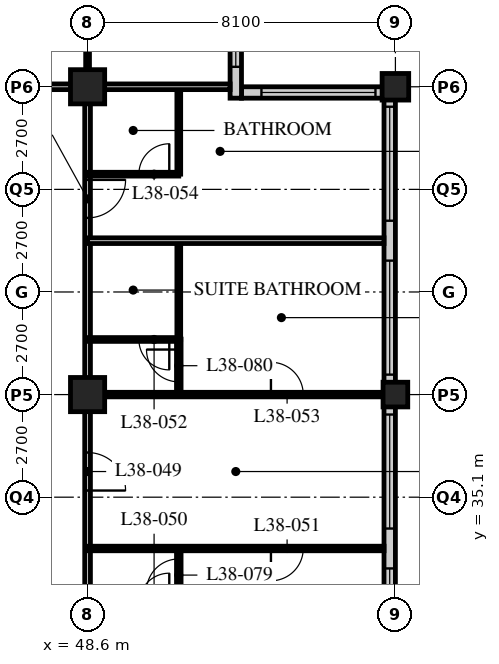
"""IFC4 building model, lengths in metres.
Left out: names, types, materials, properties, quantities, classifications, styles, units other than length and angle.
Written with IfcOpenShell. Run it as: python <this file> out.ifc"""

import sys

from ifc_helpers import new_model, si_unit, direction, frame, frame_2d, origin, origin_2d, place, context, subcontext, project, spatial, rectangle, hollow_rectangle, extrude, element, fill, save


model = new_model("IFC4")
c1 = context("Model", 3, precision=1e-05, world=origin(), true_north=direction((0.0, 1.0)))
c2 = subcontext(c1, "Body", "Model", "MODEL_VIEW")
j1 = project(units=[si_unit("LENGTHUNIT", "METRE"), si_unit("PLANEANGLEUNIT", "RADIAN")], contexts=[c1])
p1 = place(None, origin())
s1 = spatial("IfcSite", under=j1, at=p1, CompositionType="ELEMENT")
p2 = place(p1, origin())
s2 = spatial("IfcBuilding", under=s1, at=p2, CompositionType="ELEMENT")
p3 = place(p2, frame((0.0, 0.0, 147.6)))
s3 = spatial("IfcBuildingStorey", under=s2, at=p3, CompositionType="ELEMENT", Elevation=147.6)
for number, where, z_axis, x_axis in (
    (1, (48.6, 37.8, 0.0), (0.0, 0.0, 1.0), (1.0, 0.0, 0.0)),
    (2, (48.6, 45.9, 0.0), (0.0, 0.0, 1.0), (1.0, 0.0, 0.0)),
):
    element("IfcColumn", number, at=place(p3, frame(where, z_axis=z_axis, x_axis=x_axis)), inside=s3, PredefinedType="COLUMN", context=c2, shape_type="SweptSolid", body=[
        extrude(hollow_rectangle(XDim=0.9, YDim=0.9, WallThickness=0.1, at=origin_2d()), origin(), (0.0, 0.0, 1.0), 3.4),
    ])
p4 = place(p3, frame((56.7, 37.8, 0.0), z_axis=(0.0, 0.0, 1.0), x_axis=(1.0, 0.0, 0.0)))
e3 = element("IfcColumn", 3, at=p4, inside=s3, PredefinedType="COLUMN", context=c2, shape_type="SweptSolid", body=[
    extrude(hollow_rectangle(XDim=0.65, YDim=0.65, WallThickness=0.055, at=origin_2d()), origin(), (0.0, 0.0, 1.0), 3.4),
])
p5 = place(p3, frame((56.7, 45.9, 0.0), z_axis=(0.0, 0.0, 1.0), x_axis=(1.0, 0.0, 0.0)))
e4 = element("IfcColumn", 4, at=p5, inside=s3, PredefinedType="COLUMN", context=c2, shape_type="SweptSolid", body=[
    extrude(hollow_rectangle(XDim=0.7, YDim=0.7, WallThickness=0.07, at=origin_2d()), origin(), (0.0, 0.0, 1.0), 3.4),
])
p6 = place(p3, frame((56.55, 13.8, 0.0), z_axis=(0.0, 0.0, 1.0), x_axis=(0.0, 1.0, 0.0)))
e5 = element("IfcWall", 5, at=p6, inside=s3, PredefinedType="SOLIDWALL", context=c2, shape_type="SweptSolid", body=[
    extrude(rectangle(XDim=32.1, YDim=0.3, at=frame_2d((16.05, 0.0))), origin(), (0.0, 0.0, 1.0), 3.19),
])
p7 = place(p6, frame((0.225, 0.0, 0.9)))
e6 = element("IfcOpeningElement", 6, at=p7, cuts=e5, PredefinedType="OPENING", context=c2, shape_type="SweptSolid", body=[
    extrude(rectangle(XDim=3.0, YDim=1.4, at=frame_2d((1.5, 0.7))), frame((0.0, 0.16, 0.0), z_axis=(0.0, -1.0, 0.0), x_axis=(1.0, 0.0, 0.0)), (0.0, 0.0, 1.0), 0.32),
])
p8 = place(p6, frame((4.275, 0.0, 0.9)))
e7 = element("IfcOpeningElement", 7, at=p8, cuts=e5, PredefinedType="OPENING", context=c2, shape_type="SweptSolid", body=[
    extrude(rectangle(XDim=3.0, YDim=1.4, at=frame_2d((1.5, 0.7))), frame((0.0, 0.16, 0.0), z_axis=(0.0, -1.0, 0.0), x_axis=(1.0, 0.0, 0.0)), (0.0, 0.0, 1.0), 0.32),
])
p9 = place(p6, frame((8.325, 0.0, 0.9)))
e8 = element("IfcOpeningElement", 8, at=p9, cuts=e5, PredefinedType="OPENING", context=c2, shape_type="SweptSolid", body=[
    extrude(rectangle(XDim=3.0, YDim=1.4, at=frame_2d((1.5, 0.7))), frame((0.0, 0.16, 0.0), z_axis=(0.0, -1.0, 0.0), x_axis=(1.0, 0.0, 0.0)), (0.0, 0.0, 1.0), 0.32),
])
p10 = place(p6, frame((12.375, 0.0, 0.9)))
e9 = element("IfcOpeningElement", 9, at=p10, cuts=e5, PredefinedType="OPENING", context=c2, shape_type="SweptSolid", body=[
    extrude(rectangle(XDim=3.0, YDim=1.4, at=frame_2d((1.5, 0.7))), frame((0.0, 0.16, 0.0), z_axis=(0.0, -1.0, 0.0), x_axis=(1.0, 0.0, 0.0)), (0.0, 0.0, 1.0), 0.32),
])
p11 = place(p6, frame((16.425, 0.0, 0.9)))
e10 = element("IfcOpeningElement", 10, at=p11, cuts=e5, PredefinedType="OPENING", context=c2, shape_type="SweptSolid", body=[
    extrude(rectangle(XDim=3.0, YDim=1.4, at=frame_2d((1.5, 0.7))), frame((0.0, 0.16, 0.0), z_axis=(0.0, -1.0, 0.0), x_axis=(1.0, 0.0, 0.0)), (0.0, 0.0, 1.0), 0.32),
])
p12 = place(p6, frame((20.475, 0.0, 0.9)))
e11 = element("IfcOpeningElement", 11, at=p12, cuts=e5, PredefinedType="OPENING", context=c2, shape_type="SweptSolid", body=[
    extrude(rectangle(XDim=3.0, YDim=1.4, at=frame_2d((1.5, 0.7))), frame((0.0, 0.16, 0.0), z_axis=(0.0, -1.0, 0.0), x_axis=(1.0, 0.0, 0.0)), (0.0, 0.0, 1.0), 0.32),
])
p13 = place(p6, frame((24.525, 0.0, 0.9)))
e12 = element("IfcOpeningElement", 12, at=p13, cuts=e5, PredefinedType="OPENING", context=c2, shape_type="SweptSolid", body=[
    extrude(rectangle(XDim=3.0, YDim=1.4, at=frame_2d((1.5, 0.7))), frame((0.0, 0.16, 0.0), z_axis=(0.0, -1.0, 0.0), x_axis=(1.0, 0.0, 0.0)), (0.0, 0.0, 1.0), 0.32),
])
p14 = place(p6, frame((28.575, 0.0, 0.9)))
e13 = element("IfcOpeningElement", 13, at=p14, cuts=e5, PredefinedType="OPENING", context=c2, shape_type="SweptSolid", body=[
    extrude(rectangle(XDim=3.0, YDim=1.4, at=frame_2d((1.5, 0.7))), frame((0.0, 0.16, 0.0), z_axis=(0.0, -1.0, 0.0), x_axis=(1.0, 0.0, 0.0)), (0.0, 0.0, 1.0), 0.32),
])
p15 = place(p3, frame((56.4, 45.75, 0.0), z_axis=(0.0, 0.0, 1.0), x_axis=(-1.0, 0.0, 0.0)))
e14 = element("IfcWall", 14, at=p15, inside=s3, PredefinedType="SOLIDWALL", context=c2, shape_type="SweptSolid", body=[
    extrude(rectangle(XDim=3.75, YDim=0.3, at=frame_2d((1.875, 0.0))), origin(), (0.0, 0.0, 1.0), 3.19),
])
p16 = place(p15, frame((0.225, 0.0, 0.9)))
e15 = element("IfcOpeningElement", 15, at=p16, cuts=e14, PredefinedType="OPENING", context=c2, shape_type="SweptSolid", body=[
    extrude(rectangle(XDim=3.0, YDim=1.4, at=frame_2d((1.5, 0.7))), frame((0.0, 0.16, 0.0), z_axis=(0.0, -1.0, 0.0), x_axis=(1.0, 0.0, 0.0)), (0.0, 0.0, 1.0), 0.32),
])
p17 = place(p3, frame((52.5, 45.6, 0.0), z_axis=(0.0, 0.0, 1.0), x_axis=(0.0, 1.0, 0.0)))
e16 = element("IfcWall", 16, at=p17, inside=s3, PredefinedType="SOLIDWALL", context=c2, shape_type="SweptSolid", body=[
    extrude(rectangle(XDim=4.35, YDim=0.3, at=frame_2d((2.175, 0.0))), origin(), (0.0, 0.0, 1.0), 3.19),
])
p18 = place(p17, frame((0.825, 0.0, 0.9)))
e17 = element("IfcOpeningElement", 17, at=p18, cuts=e16, PredefinedType="OPENING", context=c2, shape_type="SweptSolid", body=[
    extrude(rectangle(XDim=3.0, YDim=1.4, at=frame_2d((1.5, 0.7))), frame((0.0, 0.16, 0.0), z_axis=(0.0, -1.0, 0.0), x_axis=(1.0, 0.0, 0.0)), (0.0, 0.0, 1.0), 0.32),
])
p19 = place(p3, frame((12.15, 45.9, 0.0), z_axis=(0.0, 0.0, 1.0), x_axis=(1.0, 0.0, 0.0)))
e18 = element("IfcWall", 18, at=p19, inside=s3, PredefinedType="PARTITIONING", context=c2, shape_type="SweptSolid", body=[
    extrude(rectangle(XDim=36.45, YDim=0.15, at=frame_2d((18.225, 0.0))), origin(), (0.0, 0.0, 1.0), 2.42),
])
p20 = place(p19, frame((9.225, 0.0, 0.0)))
e19 = element("IfcOpeningElement", 19, at=p20, cuts=e18, PredefinedType="OPENING", context=c2, shape_type="SweptSolid", body=[
    extrude(rectangle(XDim=1.8, YDim=2.4, at=frame_2d((0.9, 1.2))), frame((0.0, 0.085, 0.0), z_axis=(0.0, -1.0, 0.0), x_axis=(1.0, 0.0, 0.0)), (0.0, 0.0, 1.0), 0.17),
])
p21 = place(p19, frame((21.65, 0.0, 0.0)))
e20 = element("IfcOpeningElement", 20, at=p21, cuts=e18, PredefinedType="OPENING", context=c2, shape_type="SweptSolid", body=[
    extrude(rectangle(XDim=1.0, YDim=2.1, at=frame_2d((0.5, 1.05))), frame((0.0, 0.085, 0.0), z_axis=(0.0, -1.0, 0.0), x_axis=(1.0, 0.0, 0.0)), (0.0, 0.0, 1.0), 0.17),
])
p22 = place(p19, frame((24.9, 0.0, 0.0)))
e21 = element("IfcOpeningElement", 21, at=p22, cuts=e18, PredefinedType="OPENING", context=c2, shape_type="SweptSolid", body=[
    extrude(rectangle(XDim=1.0, YDim=2.1, at=frame_2d((0.5, 1.05))), frame((0.0, 0.085, 0.0), z_axis=(0.0, -1.0, 0.0), x_axis=(1.0, 0.0, 0.0)), (0.0, 0.0, 1.0), 0.17),
])
p23 = place(p19, frame((30.8, 0.0, 0.0)))
e22 = element("IfcOpeningElement", 22, at=p23, cuts=e18, PredefinedType="OPENING", context=c2, shape_type="SweptSolid", body=[
    extrude(rectangle(XDim=1.0, YDim=2.1, at=frame_2d((0.5, 1.05))), frame((0.0, 0.085, 0.0), z_axis=(0.0, -1.0, 0.0), x_axis=(1.0, 0.0, 0.0)), (0.0, 0.0, 1.0), 0.17),
])
p24 = place(p19, frame((32.825, 0.0, 0.0)))
e23 = element("IfcOpeningElement", 23, at=p24, cuts=e18, PredefinedType="OPENING", context=c2, shape_type="SweptSolid", body=[
    extrude(rectangle(XDim=1.0, YDim=2.1, at=frame_2d((0.5, 1.05))), frame((0.0, 0.085, 0.0), z_axis=(0.0, -1.0, 0.0), x_axis=(1.0, 0.0, 0.0)), (0.0, 0.0, 1.0), 0.17),
])
p25 = place(p19, frame((1.525, 0.0, 0.0)))
e24 = element("IfcOpeningElement", 24, at=p25, cuts=e18, PredefinedType="OPENING", context=c2, shape_type="SweptSolid", body=[
    extrude(rectangle(XDim=1.0, YDim=2.1, at=frame_2d((0.5, 1.05))), frame((0.0, 0.085, 0.0), z_axis=(0.0, -1.0, 0.0), x_axis=(1.0, 0.0, 0.0)), (0.0, 0.0, 1.0), 0.17),
])
p26 = place(p3, frame((48.6, 21.6, 0.0), z_axis=(0.0, 0.0, 1.0), x_axis=(0.0, 1.0, 0.0)))
e25 = element("IfcWall", 25, at=p26, inside=s3, PredefinedType="PARTITIONING", context=c2, shape_type="SweptSolid", body=[
    extrude(rectangle(XDim=24.3, YDim=0.15, at=frame_2d((12.15, 0.0))), origin(), (0.0, 0.0, 1.0), 2.42),
])
p27 = place(p26, frame((2.75, 0.0, 0.0)))
e26 = element("IfcOpeningElement", 26, at=p27, cuts=e25, PredefinedType="OPENING", context=c2, shape_type="SweptSolid", body=[
    extrude(rectangle(XDim=1.0, YDim=2.1, at=frame_2d((0.5, 1.05))), frame((0.0, 0.085, 0.0), z_axis=(0.0, -1.0, 0.0), x_axis=(1.0, 0.0, 0.0)), (0.0, 0.0, 1.0), 0.17),
])
p28 = place(p26, frame((4.65, 0.0, 0.0)))
e27 = element("IfcOpeningElement", 27, at=p28, cuts=e25, PredefinedType="OPENING", context=c2, shape_type="SweptSolid", body=[
    extrude(rectangle(XDim=1.0, YDim=2.1, at=frame_2d((0.5, 1.05))), frame((0.0, 0.085, 0.0), z_axis=(0.0, -1.0, 0.0), x_axis=(1.0, 0.0, 0.0)), (0.0, 0.0, 1.0), 0.17),
])
p29 = place(p26, frame((13.675, 0.0, 0.0)))
e28 = element("IfcOpeningElement", 28, at=p29, cuts=e25, PredefinedType="OPENING", context=c2, shape_type="SweptSolid", body=[
    extrude(rectangle(XDim=1.0, YDim=2.1, at=frame_2d((0.5, 1.05))), frame((0.0, 0.085, 0.0), z_axis=(0.0, -1.0, 0.0), x_axis=(1.0, 0.0, 0.0)), (0.0, 0.0, 1.0), 0.17),
])
p30 = place(p26, frame((20.85, 0.0, 0.0)))
e29 = element("IfcOpeningElement", 29, at=p30, cuts=e25, PredefinedType="OPENING", context=c2, shape_type="SweptSolid", body=[
    extrude(rectangle(XDim=1.0, YDim=2.1, at=frame_2d((0.5, 1.05))), frame((0.0, 0.085, 0.0), z_axis=(0.0, -1.0, 0.0), x_axis=(1.0, 0.0, 0.0)), (0.0, 0.0, 1.0), 0.17),
])
p31 = place(p3, frame((48.6, 33.75, 0.0), z_axis=(0.0, 0.0, 1.0), x_axis=(1.0, 0.0, 0.0)))
e30 = element("IfcWall", 30, at=p31, inside=s3, PredefinedType="PARTITIONING", context=c2, shape_type="SweptSolid", body=[
    extrude(rectangle(XDim=7.8, YDim=0.12, at=frame_2d((3.9, 0.0))), origin(), (0.0, 0.0, 1.0), 3.19),
])
p32 = place(p31, frame((4.825, 0.0, 0.0)))
e31 = element("IfcOpeningElement", 31, at=p32, cuts=e30, PredefinedType="OPENING", context=c2, shape_type="SweptSolid", body=[
    extrude(rectangle(XDim=0.85, YDim=2.1, at=frame_2d((0.425, 1.05))), frame((0.0, 0.07, 0.0), z_axis=(0.0, -1.0, 0.0), x_axis=(1.0, 0.0, 0.0)), (0.0, 0.0, 1.0), 0.14),
])
p33 = place(p3, frame((51.0, 39.25, 0.0), z_axis=(0.0, 0.0, 1.0), x_axis=(0.0, 1.0, 0.0)))
e32 = element("IfcWall", 32, at=p33, inside=s3, PredefinedType="PARTITIONING", context=c2, shape_type="SweptSolid", body=[
    extrude(rectangle(XDim=2.6, YDim=0.1, at=frame_2d((1.3, 0.0))), origin(), (0.0, 0.0, 1.0), 3.19),
])
p34 = place(p3, frame((48.6, 39.25, 0.0), z_axis=(0.0, 0.0, 1.0), x_axis=(1.0, 0.0, 0.0)))
e33 = element("IfcWall", 33, at=p34, inside=s3, PredefinedType="PARTITIONING", context=c2, shape_type="SweptSolid", body=[
    extrude(rectangle(XDim=2.4, YDim=0.1, at=frame_2d((1.2, 0.0))), origin(), (0.0, 0.0, 1.0), 3.19),
])
p35 = place(p34, frame((1.35, 0.0, 0.0)))
e34 = element("IfcOpeningElement", 34, at=p35, cuts=e33, PredefinedType="OPENING", context=c2, shape_type="SweptSolid", body=[
    extrude(rectangle(XDim=0.8, YDim=2.1, at=frame_2d((0.4, 1.05))), frame((0.0, 0.06, 0.0), z_axis=(0.0, -1.0, 0.0), x_axis=(1.0, 0.0, 0.0)), (0.0, 0.0, 1.0), 0.12),
])
p36 = place(p3, frame((48.6, 37.8, 0.0), z_axis=(0.0, 0.0, 1.0), x_axis=(1.0, 0.0, 0.0)))
e35 = element("IfcWall", 35, at=p36, inside=s3, PredefinedType="PARTITIONING", context=c2, shape_type="SweptSolid", body=[
    extrude(rectangle(XDim=7.8, YDim=0.12, at=frame_2d((3.9, 0.0))), origin(), (0.0, 0.0, 1.0), 2.42),
])
p37 = place(p36, frame((4.825, 0.0, 0.0)))
e36 = element("IfcOpeningElement", 36, at=p37, cuts=e35, PredefinedType="OPENING", context=c2, shape_type="SweptSolid", body=[
    extrude(rectangle(XDim=0.85, YDim=2.1, at=frame_2d((0.425, 1.05))), frame((0.0, 0.07, 0.0), z_axis=(0.0, -1.0, 0.0), x_axis=(1.0, 0.0, 0.0)), (0.0, 0.0, 1.0), 0.14),
])
p38 = place(p3, frame((48.6, 41.85, 0.0), z_axis=(0.0, 0.0, 1.0), x_axis=(1.0, 0.0, 0.0)))
e37 = element("IfcWall", 37, at=p38, inside=s3, PredefinedType="PARTITIONING", context=c2, shape_type="SweptSolid", body=[
    extrude(rectangle(XDim=7.8, YDim=0.15, at=frame_2d((3.9, 0.0))), origin(), (0.0, 0.0, 1.0), 3.19),
])
p39 = place(p3, frame((51.0, 43.6, 0.0), z_axis=(0.0, 0.0, 1.0), x_axis=(0.0, 1.0, 0.0)))
e38 = element("IfcWall", 38, at=p39, inside=s3, PredefinedType="PARTITIONING", context=c2, shape_type="SweptSolid", body=[
    extrude(rectangle(XDim=2.3, YDim=0.1, at=frame_2d((1.15, 0.0))), origin(), (0.0, 0.0, 1.0), 3.19),
])
p40 = place(p3, frame((48.6, 43.6, 0.0), z_axis=(0.0, 0.0, 1.0), x_axis=(1.0, 0.0, 0.0)))
e39 = element("IfcWall", 39, at=p40, inside=s3, PredefinedType="PARTITIONING", context=c2, shape_type="SweptSolid", body=[
    extrude(rectangle(XDim=2.4, YDim=0.1, at=frame_2d((1.2, 0.0))), origin(), (0.0, 0.0, 1.0), 3.19),
])
p41 = place(p40, frame((1.35, 0.0, 0.0)))
e40 = element("IfcOpeningElement", 40, at=p41, cuts=e39, PredefinedType="OPENING", context=c2, shape_type="SweptSolid", body=[
    extrude(rectangle(XDim=0.8, YDim=2.1, at=frame_2d((0.4, 1.05))), frame((0.0, 0.06, 0.0), z_axis=(0.0, -1.0, 0.0), x_axis=(1.0, 0.0, 0.0)), (0.0, 0.0, 1.0), 0.12),
])
p42 = place(p3, frame((48.6, 45.9, 0.0), z_axis=(0.0, 0.0, 1.0), x_axis=(0.0, 1.0, 0.0)))
e41 = element("IfcWall", 41, at=p42, inside=s3, PredefinedType="PARTITIONING", context=c2, shape_type="SweptSolid", body=[
    extrude(rectangle(XDim=2.4, YDim=0.1, at=frame_2d((1.2, 0.0))), origin(), (0.0, 0.0, 1.0), 2.42),
])
p43 = place(p3, frame((48.6, 45.9, 0.0), z_axis=(0.0, 0.0, 1.0), x_axis=(1.0, 0.0, 0.0)))
e42 = element("IfcWall", 42, at=p43, inside=s3, PredefinedType="PARTITIONING", context=c2, shape_type="SweptSolid", body=[
    extrude(rectangle(XDim=3.75, YDim=0.15, at=frame_2d((1.875, 0.0))), origin(), (0.0, 0.0, 1.0), 2.42),
])
p44 = place(p3, frame((51.0, 33.75, 0.0), z_axis=(0.0, 0.0, 1.0), x_axis=(0.0, -1.0, 0.0)))
e43 = element("IfcWall", 43, at=p44, inside=s3, PredefinedType="PARTITIONING", context=c2, shape_type="SweptSolid", body=[
    extrude(rectangle(XDim=1.46, YDim=0.12, at=frame_2d((0.73, 0.0))), origin(), (0.0, 0.0, 1.0), 3.19),
])
p45 = place(p44, frame((0.275, 0.0, 0.0)))
e44 = element("IfcOpeningElement", 44, at=p45, cuts=e43, PredefinedType="OPENING", context=c2, shape_type="SweptSolid", body=[
    extrude(rectangle(XDim=0.85, YDim=2.1, at=frame_2d((0.425, 1.05))), frame((0.0, 0.07, 0.0), z_axis=(0.0, -1.0, 0.0), x_axis=(1.0, 0.0, 0.0)), (0.0, 0.0, 1.0), 0.14),
])
p46 = place(p3, frame((51.0, 39.26, 0.0), z_axis=(0.0, 0.0, 1.0), x_axis=(0.0, -1.0, 0.0)))
e45 = element("IfcWall", 45, at=p46, inside=s3, PredefinedType="PARTITIONING", context=c2, shape_type="SweptSolid", body=[
    extrude(rectangle(XDim=1.46, YDim=0.12, at=frame_2d((0.73, 0.0))), origin(), (0.0, 0.0, 1.0), 3.19),
])
p47 = place(p46, frame((0.275, 0.0, 0.0)))
e46 = element("IfcOpeningElement", 46, at=p47, cuts=e45, PredefinedType="OPENING", context=c2, shape_type="SweptSolid", body=[
    extrude(rectangle(XDim=0.85, YDim=2.1, at=frame_2d((0.425, 1.05))), frame((0.0, 0.07, 0.0), z_axis=(0.0, -1.0, 0.0), x_axis=(1.0, 0.0, 0.0)), (0.0, 0.0, 1.0), 0.14),
])
p48 = place(p11, origin())
e47 = element("IfcWindow", 47, at=p48, inside=s3, PartitioningType="SINGLE_PANEL", PredefinedType="WINDOW", context=c2, shape_type="SweptSolid", body=[
    extrude(rectangle(XDim=3.0, YDim=1.4, at=frame_2d((1.5, 0.7))), frame((0.0, 0.03, 0.0), z_axis=(0.0, -1.0, 0.0), x_axis=(1.0, 0.0, 0.0)), (0.0, 0.0, 1.0), 0.06),
])
fill(e10, e47)
p49 = place(p12, origin())
e48 = element("IfcWindow", 48, at=p49, inside=s3, PartitioningType="SINGLE_PANEL", PredefinedType="WINDOW", context=c2, shape_type="SweptSolid", body=[
    extrude(rectangle(XDim=3.0, YDim=1.4, at=frame_2d((1.5, 0.7))), frame((0.0, 0.03, 0.0), z_axis=(0.0, -1.0, 0.0), x_axis=(1.0, 0.0, 0.0)), (0.0, 0.0, 1.0), 0.06),
])
fill(e11, e48)
p50 = place(p13, origin())
e49 = element("IfcWindow", 49, at=p50, inside=s3, PartitioningType="SINGLE_PANEL", PredefinedType="WINDOW", context=c2, shape_type="SweptSolid", body=[
    extrude(rectangle(XDim=3.0, YDim=1.4, at=frame_2d((1.5, 0.7))), frame((0.0, 0.03, 0.0), z_axis=(0.0, -1.0, 0.0), x_axis=(1.0, 0.0, 0.0)), (0.0, 0.0, 1.0), 0.06),
])
fill(e12, e49)
p51 = place(p14, origin())
e50 = element("IfcWindow", 50, at=p51, inside=s3, PartitioningType="SINGLE_PANEL", PredefinedType="WINDOW", context=c2, shape_type="SweptSolid", body=[
    extrude(rectangle(XDim=3.0, YDim=1.4, at=frame_2d((1.5, 0.7))), frame((0.0, 0.03, 0.0), z_axis=(0.0, -1.0, 0.0), x_axis=(1.0, 0.0, 0.0)), (0.0, 0.0, 1.0), 0.06),
])
fill(e13, e50)
p52 = place(p16, origin())
e51 = element("IfcWindow", 51, at=p52, inside=s3, PartitioningType="SINGLE_PANEL", PredefinedType="WINDOW", context=c2, shape_type="SweptSolid", body=[
    extrude(rectangle(XDim=3.0, YDim=1.4, at=frame_2d((1.5, 0.7))), frame((0.0, 0.03, 0.0), z_axis=(0.0, -1.0, 0.0), x_axis=(1.0, 0.0, 0.0)), (0.0, 0.0, 1.0), 0.06),
])
fill(e15, e51)
p53 = place(p18, origin())
e52 = element("IfcWindow", 52, at=p53, inside=s3, PartitioningType="SINGLE_PANEL", PredefinedType="WINDOW", context=c2, shape_type="SweptSolid", body=[
    extrude(rectangle(XDim=3.0, YDim=1.4, at=frame_2d((1.5, 0.7))), frame((0.0, 0.03, 0.0), z_axis=(0.0, -1.0, 0.0), x_axis=(1.0, 0.0, 0.0)), (0.0, 0.0, 1.0), 0.06),
])
fill(e17, e52)
p54 = place(p29, origin())
e53 = element("IfcDoor", 53, at=p54, inside=s3, OperationType="SINGLE_SWING_RIGHT", PredefinedType="DOOR", context=c2, shape_type="SweptSolid", body=[
    extrude(rectangle(XDim=1.0, YDim=2.1, at=frame_2d((0.5, 1.05))), frame((0.0, 0.025, 0.0), z_axis=(0.0, -1.0, 0.0), x_axis=(1.0, 0.0, 0.0)), (0.0, 0.0, 1.0), 0.05),
])
fill(e28, e53)
p55 = place(p32, origin())
e54 = element("IfcDoor", 54, at=p55, inside=s3, OperationType="SINGLE_SWING_RIGHT", PredefinedType="DOOR", context=c2, shape_type="SweptSolid", body=[
    extrude(rectangle(XDim=0.85, YDim=2.1, at=frame_2d((0.425, 1.05))), frame((0.0, 0.025, 0.0), z_axis=(0.0, -1.0, 0.0), x_axis=(1.0, 0.0, 0.0)), (0.0, 0.0, 1.0), 0.05),
])
fill(e31, e54)
p56 = place(p35, origin())
e55 = element("IfcDoor", 55, at=p56, inside=s3, OperationType="SINGLE_SWING_LEFT", PredefinedType="DOOR", context=c2, shape_type="SweptSolid", body=[
    extrude(rectangle(XDim=0.8, YDim=2.1, at=frame_2d((0.4, 1.05))), frame((0.0, 0.025, 0.0), z_axis=(0.0, -1.0, 0.0), x_axis=(1.0, 0.0, 0.0)), (0.0, 0.0, 1.0), 0.05),
])
fill(e34, e55)
p57 = place(p37, origin())
e56 = element("IfcDoor", 56, at=p57, inside=s3, OperationType="SINGLE_SWING_LEFT", PredefinedType="DOOR", context=c2, shape_type="SweptSolid", body=[
    extrude(rectangle(XDim=0.85, YDim=2.1, at=frame_2d((0.425, 1.05))), frame((0.0, 0.025, 0.0), z_axis=(0.0, -1.0, 0.0), x_axis=(1.0, 0.0, 0.0)), (0.0, 0.0, 1.0), 0.05),
])
fill(e36, e56)
p58 = place(p41, origin())
e57 = element("IfcDoor", 57, at=p58, inside=s3, OperationType="SINGLE_SWING_RIGHT", PredefinedType="DOOR", context=c2, shape_type="SweptSolid", body=[
    extrude(rectangle(XDim=0.8, YDim=2.1, at=frame_2d((0.4, 1.05))), frame((0.0, 0.025, 0.0), z_axis=(0.0, -1.0, 0.0), x_axis=(1.0, 0.0, 0.0)), (0.0, 0.0, 1.0), 0.05),
])
fill(e40, e57)
p59 = place(p30, origin())
e58 = element("IfcDoor", 58, at=p59, inside=s3, OperationType="SINGLE_SWING_LEFT", PredefinedType="DOOR", context=c2, shape_type="SweptSolid", body=[
    extrude(rectangle(XDim=1.0, YDim=2.1, at=frame_2d((0.5, 1.05))), frame((0.0, 0.025, 0.0), z_axis=(0.0, -1.0, 0.0), x_axis=(1.0, 0.0, 0.0)), (0.0, 0.0, 1.0), 0.05),
])
fill(e29, e58)
p60 = place(p45, origin())
e59 = element("IfcDoor", 59, at=p60, inside=s3, OperationType="SINGLE_SWING_LEFT", PredefinedType="DOOR", context=c2, shape_type="SweptSolid", body=[
    extrude(rectangle(XDim=0.85, YDim=2.1, at=frame_2d((0.425, 1.05))), frame((0.0, 0.025, 0.0), z_axis=(0.0, -1.0, 0.0), x_axis=(1.0, 0.0, 0.0)), (0.0, 0.0, 1.0), 0.05),
])
fill(e44, e59)
p61 = place(p47, origin())
e60 = element("IfcDoor", 60, at=p61, inside=s3, OperationType="SINGLE_SWING_RIGHT", PredefinedType="DOOR", context=c2, shape_type="SweptSolid", body=[
    extrude(rectangle(XDim=0.85, YDim=2.1, at=frame_2d((0.425, 1.05))), frame((0.0, 0.025, 0.0), z_axis=(0.0, -1.0, 0.0), x_axis=(1.0, 0.0, 0.0)), (0.0, 0.0, 1.0), 0.05),
])
fill(e46, e60)
save(model, sys.argv[1])
